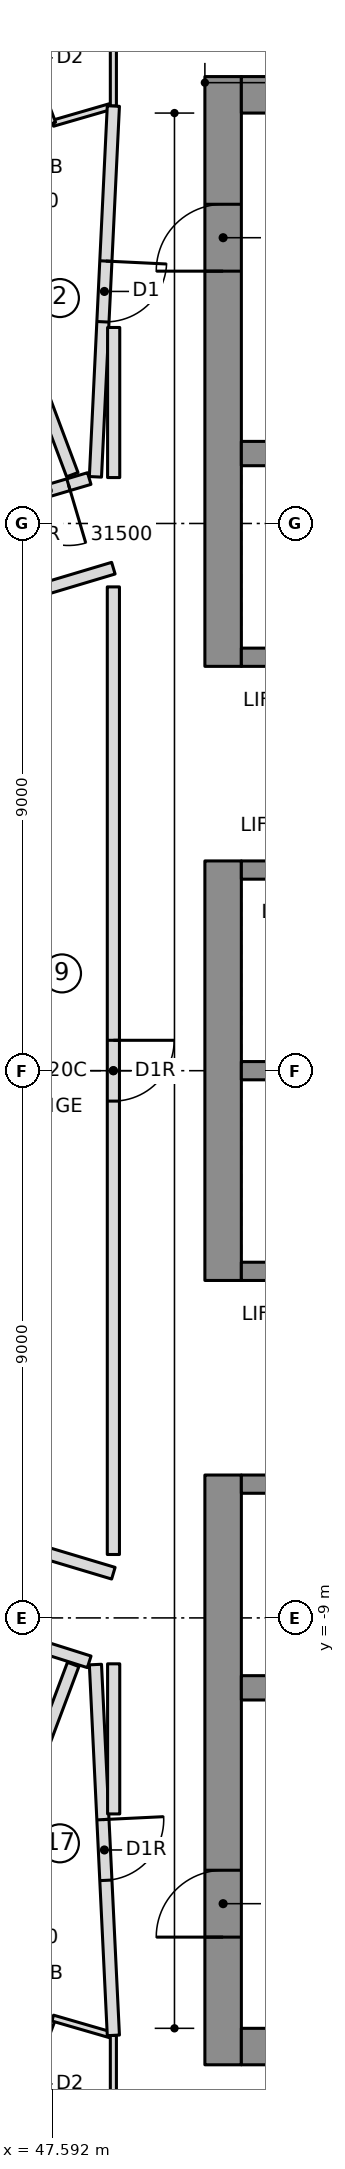
"""IFC4 building model, lengths in metres.
Left out: names, types, materials, properties, quantities, classifications, styles, units other than length and angle.
Written with IfcOpenShell. Run it as: python <this file> out.ifc"""

import sys

from ifc_helpers import new_model, si_unit, direction, frame, frame_2d, origin, place, context, subcontext, project, spatial, rectangle, extrude, element, fill, save


model = new_model("IFC4")
c1 = context("Model", 3, precision=1e-05, world=origin(), true_north=direction((0.0, 1.0)))
c2 = subcontext(c1, "Body", "Model", "MODEL_VIEW")
j1 = project(units=[si_unit("LENGTHUNIT", "METRE"), si_unit("PLANEANGLEUNIT", "RADIAN")], contexts=[c1])
p1 = place(None, origin())
s1 = spatial("IfcSite", under=j1, at=p1, CompositionType="ELEMENT")
p2 = place(p1, origin())
s2 = spatial("IfcBuilding", under=s1, at=p2, CompositionType="ELEMENT")
p3 = place(p2, frame((0.0, 0.0, 245.65)))
s3 = spatial("IfcBuildingStorey", under=s2, at=p3, CompositionType="ELEMENT", Elevation=245.65)
p4 = place(p3, frame((50.4, 6.65, 0.0), z_axis=(0.0, 0.0, 1.0), x_axis=(0.0, 1.0, 0.0)))
e1 = element("IfcWall", 1, at=p4, inside=s3, PredefinedType="SHEAR", context=c2, shape_type="SweptSolid", body=[
    extrude(rectangle(XDim=9.7, YDim=0.6, at=frame_2d((4.85, 0.0))), origin(), (0.0, 0.0, 1.0), 3.55),
])
p5 = place(p4, frame((6.5, 0.0, 0.0)))
e2 = element("IfcOpeningElement", 2, at=p5, cuts=e1, PredefinedType="OPENING", context=c2, shape_type="SweptSolid", body=[
    extrude(rectangle(XDim=1.1, YDim=2.1, at=frame_2d((0.55, 1.05))), frame((0.0, 0.31, 0.0), z_axis=(0.0, -1.0, 0.0), x_axis=(1.0, 0.0, 0.0)), (0.0, 0.0, 1.0), 0.62),
])
p6 = place(p3, frame((50.4, -3.45, 0.0), z_axis=(0.0, 0.0, 1.0), x_axis=(0.0, 1.0, 0.0)))
e3 = element("IfcWall", 3, at=p6, inside=s3, PredefinedType="SHEAR", context=c2, shape_type="SweptSolid", body=[
    extrude(rectangle(XDim=6.9, YDim=0.6, at=frame_2d((3.45, 0.0))), origin(), (0.0, 0.0, 1.0), 3.55),
])
p7 = place(p3, frame((50.4, -16.35, 0.0), z_axis=(0.0, 0.0, 1.0), x_axis=(0.0, 1.0, 0.0)))
e4 = element("IfcWall", 4, at=p7, inside=s3, PredefinedType="SHEAR", context=c2, shape_type="SweptSolid", body=[
    extrude(rectangle(XDim=9.7, YDim=0.6, at=frame_2d((4.85, 0.0))), origin(), (0.0, 0.0, 1.0), 3.55),
])
p8 = place(p7, frame((2.1, 0.0, 0.0)))
e5 = element("IfcOpeningElement", 5, at=p8, cuts=e4, PredefinedType="OPENING", context=c2, shape_type="SweptSolid", body=[
    extrude(rectangle(XDim=1.1, YDim=2.1, at=frame_2d((0.55, 1.05))), frame((0.0, 0.31, 0.0), z_axis=(0.0, -1.0, 0.0), x_axis=(1.0, 0.0, 0.0)), (0.0, 0.0, 1.0), 0.62),
])
for number, where, z_axis, x_axis in (
    (6, (50.7, 16.05, 0.0), (0.0, 0.0, 1.0), (1.0, 0.0, 0.0)),
    (7, (50.7, -16.05, 0.0), (0.0, 0.0, 1.0), (1.0, 0.0, 0.0)),
):
    element("IfcWall", number, at=place(p3, frame(where, z_axis=z_axis, x_axis=x_axis)), inside=s3, PredefinedType="SHEAR", context=c2, shape_type="SweptSolid", body=[
        extrude(rectangle(XDim=13.62, YDim=0.6, at=frame_2d((6.81, 0.0))), origin(), (0.0, 0.0, 1.0), 3.55),
    ])
p9 = place(p3, frame((50.7, 10.15, 0.0), z_axis=(0.0, 0.0, 1.0), x_axis=(1.0, 0.0, 0.0)))
e8 = element("IfcWall", 8, at=p9, inside=s3, PredefinedType="SHEAR", context=c2, shape_type="SweptSolid", body=[
    extrude(rectangle(XDim=13.02, YDim=0.4, at=frame_2d((6.51, 0.0))), origin(), (0.0, 0.0, 1.0), 3.55),
])
p10 = place(p9, frame((0.7, 0.0, 0.0)))
e9 = element("IfcOpeningElement", 9, at=p10, cuts=e8, PredefinedType="OPENING", context=c2, shape_type="SweptSolid", body=[
    extrude(rectangle(XDim=1.1, YDim=2.1, at=frame_2d((0.55, 1.05))), frame((0.0, 0.21, 0.0), z_axis=(0.0, -1.0, 0.0), x_axis=(1.0, 0.0, 0.0)), (0.0, 0.0, 1.0), 0.42),
])
p11 = place(p9, frame((3.5, 0.0, 0.0)))
e10 = element("IfcOpeningElement", 10, at=p11, cuts=e8, PredefinedType="OPENING", context=c2, shape_type="SweptSolid", body=[
    extrude(rectangle(XDim=1.1, YDim=2.1, at=frame_2d((0.55, 1.05))), frame((0.0, 0.21, 0.0), z_axis=(0.0, -1.0, 0.0), x_axis=(1.0, 0.0, 0.0)), (0.0, 0.0, 1.0), 0.42),
])
p12 = place(p3, frame((50.7, -10.15, 0.0), z_axis=(0.0, 0.0, 1.0), x_axis=(1.0, 0.0, 0.0)))
e11 = element("IfcWall", 11, at=p12, inside=s3, PredefinedType="SHEAR", context=c2, shape_type="SweptSolid", body=[
    extrude(rectangle(XDim=13.02, YDim=0.4, at=frame_2d((6.51, 0.0))), origin(), (0.0, 0.0, 1.0), 3.55),
])
p13 = place(p3, frame((50.7, 0.0, 0.0), z_axis=(0.0, 0.0, 1.0), x_axis=(1.0, 0.0, 0.0)))
e12 = element("IfcWall", 12, at=p13, inside=s3, PredefinedType="SHEAR", context=c2, shape_type="SweptSolid", body=[
    extrude(rectangle(XDim=10.9, YDim=0.3, at=frame_2d((5.45, 0.0))), origin(), (0.0, 0.0, 1.0), 3.55),
])
p14 = place(p3, frame((50.7, 3.3, 0.0), z_axis=(0.0, 0.0, 1.0), x_axis=(1.0, 0.0, 0.0)))
e13 = element("IfcWall", 13, at=p14, inside=s3, PredefinedType="SHEAR", context=c2, shape_type="SweptSolid", body=[
    extrude(rectangle(XDim=10.9, YDim=0.3, at=frame_2d((5.45, 0.0))), origin(), (0.0, 0.0, 1.0), 3.55),
])
p15 = place(p14, frame((0.7, 0.0, 0.0)))
e14 = element("IfcOpeningElement", 14, at=p15, cuts=e13, PredefinedType="OPENING", context=c2, shape_type="SweptSolid", body=[
    extrude(rectangle(XDim=1.1, YDim=2.1, at=frame_2d((0.55, 1.05))), frame((0.0, 0.16, 0.0), z_axis=(0.0, -1.0, 0.0), x_axis=(1.0, 0.0, 0.0)), (0.0, 0.0, 1.0), 0.32),
])
p16 = place(p14, frame((3.5, 0.0, 0.0)))
e15 = element("IfcOpeningElement", 15, at=p16, cuts=e13, PredefinedType="OPENING", context=c2, shape_type="SweptSolid", body=[
    extrude(rectangle(XDim=1.1, YDim=2.1, at=frame_2d((0.55, 1.05))), frame((0.0, 0.16, 0.0), z_axis=(0.0, -1.0, 0.0), x_axis=(1.0, 0.0, 0.0)), (0.0, 0.0, 1.0), 0.32),
])
p17 = place(p14, frame((6.4, 0.0, 0.0)))
e16 = element("IfcOpeningElement", 16, at=p17, cuts=e13, PredefinedType="OPENING", context=c2, shape_type="SweptSolid", body=[
    extrude(rectangle(XDim=0.9, YDim=2.1, at=frame_2d((0.45, 1.05))), frame((0.0, 0.16, 0.0), z_axis=(0.0, -1.0, 0.0), x_axis=(1.0, 0.0, 0.0)), (0.0, 0.0, 1.0), 0.32),
])
p18 = place(p14, frame((9.2, 0.0, 0.0)))
e17 = element("IfcOpeningElement", 17, at=p18, cuts=e13, PredefinedType="OPENING", context=c2, shape_type="SweptSolid", body=[
    extrude(rectangle(XDim=0.9, YDim=2.1, at=frame_2d((0.45, 1.05))), frame((0.0, 0.16, 0.0), z_axis=(0.0, -1.0, 0.0), x_axis=(1.0, 0.0, 0.0)), (0.0, 0.0, 1.0), 0.32),
])
p19 = place(p3, frame((50.7, 6.8, 0.0), z_axis=(0.0, 0.0, 1.0), x_axis=(1.0, 0.0, 0.0)))
e18 = element("IfcWall", 18, at=p19, inside=s3, PredefinedType="SHEAR", context=c2, shape_type="SweptSolid", body=[
    extrude(rectangle(XDim=10.9, YDim=0.3, at=frame_2d((5.45, 0.0))), origin(), (0.0, 0.0, 1.0), 3.55),
])
p20 = place(p19, frame((6.4, 0.0, 0.0)))
e19 = element("IfcOpeningElement", 19, at=p20, cuts=e18, PredefinedType="OPENING", context=c2, shape_type="SweptSolid", body=[
    extrude(rectangle(XDim=0.9, YDim=2.1, at=frame_2d((0.45, 1.05))), frame((0.0, 0.16, 0.0), z_axis=(0.0, -1.0, 0.0), x_axis=(1.0, 0.0, 0.0)), (0.0, 0.0, 1.0), 0.32),
])
p21 = place(p19, frame((9.2, 0.0, 0.0)))
e20 = element("IfcOpeningElement", 20, at=p21, cuts=e18, PredefinedType="OPENING", context=c2, shape_type="SweptSolid", body=[
    extrude(rectangle(XDim=0.9, YDim=2.1, at=frame_2d((0.45, 1.05))), frame((0.0, 0.16, 0.0), z_axis=(0.0, -1.0, 0.0), x_axis=(1.0, 0.0, 0.0)), (0.0, 0.0, 1.0), 0.32),
])
p22 = place(p3, frame((50.7, -3.3, 0.0), z_axis=(0.0, 0.0, 1.0), x_axis=(1.0, 0.0, 0.0)))
e21 = element("IfcWall", 21, at=p22, inside=s3, PredefinedType="SHEAR", context=c2, shape_type="SweptSolid", body=[
    extrude(rectangle(XDim=10.9, YDim=0.3, at=frame_2d((5.45, 0.0))), origin(), (0.0, 0.0, 1.0), 3.55),
])
p23 = place(p22, frame((9.1, 0.0, 0.0)))
e22 = element("IfcOpeningElement", 22, at=p23, cuts=e21, PredefinedType="OPENING", context=c2, shape_type="SweptSolid", body=[
    extrude(rectangle(XDim=1.1, YDim=2.1, at=frame_2d((0.55, 1.05))), frame((0.0, 0.16, 0.0), z_axis=(0.0, -1.0, 0.0), x_axis=(1.0, 0.0, 0.0)), (0.0, 0.0, 1.0), 0.32),
])
p24 = place(p3, frame((50.7, -6.8, 0.0), z_axis=(0.0, 0.0, 1.0), x_axis=(1.0, 0.0, 0.0)))
e23 = element("IfcWall", 23, at=p24, inside=s3, PredefinedType="SHEAR", context=c2, shape_type="SweptSolid", body=[
    extrude(rectangle(XDim=10.9, YDim=0.3, at=frame_2d((5.45, 0.0))), origin(), (0.0, 0.0, 1.0), 3.55),
])
p25 = place(p24, frame((6.3, 0.0, 0.0)))
e24 = element("IfcOpeningElement", 24, at=p25, cuts=e23, PredefinedType="OPENING", context=c2, shape_type="SweptSolid", body=[
    extrude(rectangle(XDim=1.1, YDim=2.1, at=frame_2d((0.55, 1.05))), frame((0.0, 0.16, 0.0), z_axis=(0.0, -1.0, 0.0), x_axis=(1.0, 0.0, 0.0)), (0.0, 0.0, 1.0), 0.32),
])
p26 = place(p24, frame((9.1, 0.0, 0.0)))
e25 = element("IfcOpeningElement", 25, at=p26, cuts=e23, PredefinedType="OPENING", context=c2, shape_type="SweptSolid", body=[
    extrude(rectangle(XDim=1.1, YDim=2.1, at=frame_2d((0.55, 1.05))), frame((0.0, 0.16, 0.0), z_axis=(0.0, -1.0, 0.0), x_axis=(1.0, 0.0, 0.0)), (0.0, 0.0, 1.0), 0.32),
])
p27 = place(p24, frame((0.8, 0.0, 0.0)))
e26 = element("IfcOpeningElement", 26, at=p27, cuts=e23, PredefinedType="OPENING", context=c2, shape_type="SweptSolid", body=[
    extrude(rectangle(XDim=0.9, YDim=2.1, at=frame_2d((0.45, 1.05))), frame((0.0, 0.16, 0.0), z_axis=(0.0, -1.0, 0.0), x_axis=(1.0, 0.0, 0.0)), (0.0, 0.0, 1.0), 0.32),
])
p28 = place(p24, frame((3.6, 0.0, 0.0)))
e27 = element("IfcOpeningElement", 27, at=p28, cuts=e23, PredefinedType="OPENING", context=c2, shape_type="SweptSolid", body=[
    extrude(rectangle(XDim=0.9, YDim=2.1, at=frame_2d((0.45, 1.05))), frame((0.0, 0.16, 0.0), z_axis=(0.0, -1.0, 0.0), x_axis=(1.0, 0.0, 0.0)), (0.0, 0.0, 1.0), 0.32),
])
p29 = place(p3, frame((48.198, 9.739, 0.0), z_axis=(0.0, 0.0, 1.0), x_axis=(-0.958866391875, -0.283857785753, 0.0)))
e28 = element("IfcWall", 28, at=p29, inside=s3, PredefinedType="PARTITIONING", context=c2, shape_type="SweptSolid", body=[
    extrude(rectangle(XDim=1.406, YDim=0.2, at=frame_2d((0.703, 0.0))), origin(), (0.0, 0.0, 1.0), 3.25),
])
p30 = place(p29, frame((0.356, 0.0, 0.0)))
e29 = element("IfcOpeningElement", 29, at=p30, cuts=e28, PredefinedType="OPENING", context=c2, shape_type="SweptSolid", body=[
    extrude(rectangle(XDim=1.0, YDim=2.1, at=frame_2d((0.5, 1.05))), frame((0.0, 0.11, 0.0), z_axis=(0.0, -1.0, 0.0), x_axis=(1.0, 0.0, 0.0)), (0.0, 0.0, 1.0), 0.22),
])
p31 = place(p3, frame((47.92, 9.803, 0.0), z_axis=(0.0, 0.0, 1.0), x_axis=(-0.351123441588, 0.936329177569, 0.0)))
e30 = element("IfcWall", 30, at=p31, inside=s3, PredefinedType="PARTITIONING", context=c2, shape_type="SweptSolid", body=[
    extrude(rectangle(XDim=9.568, YDim=0.2, at=frame_2d((4.784, 0.0))), origin(), (0.0, 0.0, 1.0), 3.25),
])
p32 = place(p3, frame((48.576, 15.865, 0.0), z_axis=(0.0, 0.0, 1.0), x_axis=(-0.960468222897, -0.278389642057, 0.0)))
e31 = element("IfcWall", 31, at=p32, inside=s3, PredefinedType="PARTITIONING", context=c2, shape_type="SweptSolid", body=[
    extrude(rectangle(XDim=1.019, YDim=0.1, at=frame_2d((0.51, 0.0))), origin(), (0.0, 0.0, 1.0), 3.25),
])
p33 = place(p3, frame((47.598, 15.582, 0.0), z_axis=(0.0, 0.0, 1.0), x_axis=(-0.351158236187, 0.936316128857, 0.0)))
e32 = element("IfcWall", 32, at=p33, inside=s3, PredefinedType="PARTITIONING", context=c2, shape_type="SweptSolid", body=[
    extrude(rectangle(XDim=2.307, YDim=0.1, at=frame_2d((1.153, 0.0))), origin(), (0.0, 0.0, 1.0), 3.25),
])
p34 = place(p33, frame((0.75, 0.0, 0.0)))
e33 = element("IfcOpeningElement", 33, at=p34, cuts=e32, PredefinedType="OPENING", context=c2, shape_type="SweptSolid", body=[
    extrude(rectangle(XDim=0.8, YDim=2.1, at=frame_2d((0.4, 1.05))), frame((0.0, 0.06, 0.0), z_axis=(0.0, -1.0, 0.0), x_axis=(1.0, 0.0, 0.0)), (0.0, 0.0, 1.0), 0.12),
])
p35 = place(p3, frame((39.882, -7.091, 0.0), z_axis=(0.0, 0.0, 1.0), x_axis=(0.953395918068, -0.301722096326, 0.0)))
e34 = element("IfcWall", 34, at=p35, inside=s3, PredefinedType="PARTITIONING", context=c2, shape_type="SweptSolid", body=[
    extrude(rectangle(XDim=8.722, YDim=0.2, at=frame_2d((4.361, 0.0))), origin(), (0.0, 0.0, 1.0), 3.25),
])
p36 = place(p35, frame((3.05, 0.0, 0.0)))
e35 = element("IfcOpeningElement", 35, at=p36, cuts=e34, PredefinedType="OPENING", context=c2, shape_type="SweptSolid", body=[
    extrude(rectangle(XDim=1.0, YDim=2.1, at=frame_2d((0.5, 1.05))), frame((0.0, 0.11, 0.0), z_axis=(0.0, -1.0, 0.0), x_axis=(1.0, 0.0, 0.0)), (0.0, 0.0, 1.0), 0.22),
])
p37 = place(p3, frame((44.56, -18.762, 0.0), z_axis=(0.0, 0.0, 1.0), x_axis=(0.35112901071, 0.936327089129, 0.0)))
e36 = element("IfcWall", 36, at=p37, inside=s3, PredefinedType="PARTITIONING", context=c2, shape_type="SweptSolid", body=[
    extrude(rectangle(XDim=9.608, YDim=0.2, at=frame_2d((4.804, 0.0))), origin(), (0.0, 0.0, 1.0), 3.25),
])
p38 = place(p3, frame((46.788, -17.741, 0.0), z_axis=(0.0, 0.0, 1.0), x_axis=(0.351158236187, 0.936316128857, 0.0)))
e37 = element("IfcWall", 37, at=p38, inside=s3, PredefinedType="PARTITIONING", context=c2, shape_type="SweptSolid", body=[
    extrude(rectangle(XDim=2.307, YDim=0.1, at=frame_2d((1.153, 0.0))), origin(), (0.0, 0.0, 1.0), 3.25),
])
p39 = place(p38, frame((0.75, 0.0, 0.0)))
e38 = element("IfcOpeningElement", 38, at=p39, cuts=e37, PredefinedType="OPENING", context=c2, shape_type="SweptSolid", body=[
    extrude(rectangle(XDim=0.8, YDim=2.1, at=frame_2d((0.4, 1.05))), frame((0.0, 0.06, 0.0), z_axis=(0.0, -1.0, 0.0), x_axis=(1.0, 0.0, 0.0)), (0.0, 0.0, 1.0), 0.12),
])
p40 = place(p3, frame((47.598, -15.582, 0.0), z_axis=(0.0, 0.0, 1.0), x_axis=(0.960468222897, -0.278389642057, 0.0)))
e39 = element("IfcWall", 39, at=p40, inside=s3, PredefinedType="PARTITIONING", context=c2, shape_type="SweptSolid", body=[
    extrude(rectangle(XDim=1.019, YDim=0.1, at=frame_2d((0.51, 0.0))), origin(), (0.0, 0.0, 1.0), 3.25),
])
for number, where, z_axis, x_axis in (
    (40, (48.595, 18.296, 0.0), (0.0, 0.0, 1.0), (0.0, -1.0, 0.0)),
    (41, (48.595, -15.866, 0.0), (0.0, 0.0, 1.0), (0.0, -1.0, 0.0)),
):
    element("IfcWall", number, at=place(p3, frame(where, z_axis=z_axis, x_axis=x_axis)), inside=s3, PredefinedType="PARTITIONING", context=c2, shape_type="SweptSolid", body=[
        extrude(rectangle(XDim=2.431, YDim=0.1, at=frame_2d((1.215, 0.0))), origin(), (0.0, 0.0, 1.0), 3.25),
    ])
p41 = place(p3, frame((48.595, 7.957, 0.0), z_axis=(0.0, 0.0, 1.0), x_axis=(0.0, -1.0, 0.0)))
e42 = element("IfcWall", 42, at=p41, inside=s3, PredefinedType="PARTITIONING", context=c2, shape_type="SweptSolid", body=[
    extrude(rectangle(XDim=15.914, YDim=0.2, at=frame_2d((7.957, 0.0))), origin(), (0.0, 0.0, 1.0), 3.25),
])
p42 = place(p41, frame((7.457, 0.0, 0.0)))
e43 = element("IfcOpeningElement", 43, at=p42, cuts=e42, PredefinedType="OPENING", context=c2, shape_type="SweptSolid", body=[
    extrude(rectangle(XDim=1.0, YDim=2.1, at=frame_2d((0.5, 1.05))), frame((0.0, 0.11, 0.0), z_axis=(0.0, -1.0, 0.0), x_axis=(1.0, 0.0, 0.0)), (0.0, 0.0, 1.0), 0.22),
])
p43 = place(p3, frame((48.595, 15.866, 0.0), z_axis=(0.0, 0.0, 1.0), x_axis=(-0.048302241024, -0.998832765538, 0.0)))
e44 = element("IfcWall", 44, at=p43, inside=s3, PredefinedType="PARTITIONING", context=c2, shape_type="SweptSolid", body=[
    extrude(rectangle(XDim=6.106, YDim=0.2, at=frame_2d((3.053, 0.0))), origin(), (0.0, 0.0, 1.0), 3.25),
])
p44 = place(p43, frame((2.553, 0.0, 0.0)))
e45 = element("IfcOpeningElement", 45, at=p44, cuts=e44, PredefinedType="OPENING", context=c2, shape_type="SweptSolid", body=[
    extrude(rectangle(XDim=1.0, YDim=2.1, at=frame_2d((0.5, 1.05))), frame((0.0, 0.11, 0.0), z_axis=(0.0, -1.0, 0.0), x_axis=(1.0, 0.0, 0.0)), (0.0, 0.0, 1.0), 0.22),
])
p45 = place(p3, frame((48.3, -9.767, 0.0), z_axis=(0.0, 0.0, 1.0), x_axis=(0.048302241024, -0.998832765538, 0.0)))
e46 = element("IfcWall", 46, at=p45, inside=s3, PredefinedType="PARTITIONING", context=c2, shape_type="SweptSolid", body=[
    extrude(rectangle(XDim=6.106, YDim=0.2, at=frame_2d((3.053, 0.0))), origin(), (0.0, 0.0, 1.0), 3.25),
])
p46 = place(p45, frame((2.553, 0.0, 0.0)))
e47 = element("IfcOpeningElement", 47, at=p46, cuts=e46, PredefinedType="OPENING", context=c2, shape_type="SweptSolid", body=[
    extrude(rectangle(XDim=1.0, YDim=2.1, at=frame_2d((0.5, 1.05))), frame((0.0, 0.11, 0.0), z_axis=(0.0, -1.0, 0.0), x_axis=(1.0, 0.0, 0.0)), (0.0, 0.0, 1.0), 0.22),
])
for number, where, z_axis, x_axis in (
    (48, (46.855, 7.744, 0.0), (0.0, 0.0, 1.0), (0.958, 0.287, 0.0)),
    (49, (48.595, -8.265, 0.0), (0.0, 0.0, 1.0), (-0.958, 0.287, 0.0)),
):
    element("IfcWall", number, at=place(p3, frame(where, z_axis=z_axis, x_axis=x_axis)), inside=s3, PredefinedType="PARTITIONING", context=c2, shape_type="SweptSolid", body=[
        extrude(rectangle(XDim=1.816, YDim=0.2, at=frame_2d((0.908, 0.0))), origin(), (0.0, 0.0, 1.0), 3.25),
    ])
p47 = place(p3, frame((48.6, 9.755, 0.0), z_axis=(0.0, 0.0, 1.0), x_axis=(0.0, 1.0, 0.0)))
e50 = element("IfcWall", 50, at=p47, inside=s3, PredefinedType="PARTITIONING", context=c2, shape_type="SweptSolid", body=[
    extrude(rectangle(XDim=2.469, YDim=0.2, at=frame_2d((1.234, 0.0))), origin(), (0.0, 0.0, 1.0), 3.25),
])
p48 = place(p3, frame((48.6, -12.224, 0.0), z_axis=(0.0, 0.0, 1.0), x_axis=(0.0, 1.0, 0.0)))
e51 = element("IfcWall", 51, at=p48, inside=s3, PredefinedType="PARTITIONING", context=c2, shape_type="SweptSolid", body=[
    extrude(rectangle(XDim=2.469, YDim=0.2, at=frame_2d((1.234, 0.0))), origin(), (0.0, 0.0, 1.0), 3.25),
])
p49 = place(p30, origin())
e52 = element("IfcDoor", 52, at=p49, inside=s3, OperationType="SINGLE_SWING_RIGHT", PredefinedType="DOOR", context=c2, shape_type="SweptSolid", body=[
    extrude(rectangle(XDim=1.0, YDim=2.1, at=frame_2d((0.5, 1.05))), frame((0.0, 0.025, 0.0), z_axis=(0.0, -1.0, 0.0), x_axis=(1.0, 0.0, 0.0)), (0.0, 0.0, 1.0), 0.05),
])
fill(e29, e52)
p50 = place(p42, origin())
e53 = element("IfcDoor", 53, at=p50, inside=s3, OperationType="SINGLE_SWING_RIGHT", PredefinedType="DOOR", context=c2, shape_type="SweptSolid", body=[
    extrude(rectangle(XDim=1.0, YDim=2.1, at=frame_2d((0.5, 1.05))), frame((0.0, 0.025, 0.0), z_axis=(0.0, -1.0, 0.0), x_axis=(1.0, 0.0, 0.0)), (0.0, 0.0, 1.0), 0.05),
])
fill(e43, e53)
p51 = place(p44, origin())
e54 = element("IfcDoor", 54, at=p51, inside=s3, OperationType="SINGLE_SWING_LEFT", PredefinedType="DOOR", context=c2, shape_type="SweptSolid", body=[
    extrude(rectangle(XDim=1.0, YDim=2.1, at=frame_2d((0.5, 1.05))), frame((0.0, 0.025, 0.0), z_axis=(0.0, -1.0, 0.0), x_axis=(1.0, 0.0, 0.0)), (0.0, 0.0, 1.0), 0.05),
])
fill(e45, e54)
p52 = place(p46, origin())
e55 = element("IfcDoor", 55, at=p52, inside=s3, OperationType="SINGLE_SWING_RIGHT", PredefinedType="DOOR", context=c2, shape_type="SweptSolid", body=[
    extrude(rectangle(XDim=1.0, YDim=2.1, at=frame_2d((0.5, 1.05))), frame((0.0, 0.025, 0.0), z_axis=(0.0, -1.0, 0.0), x_axis=(1.0, 0.0, 0.0)), (0.0, 0.0, 1.0), 0.05),
])
fill(e47, e55)
p53 = place(p5, origin())
e56 = element("IfcDoor", 56, at=p53, inside=s3, OperationType="SINGLE_SWING_RIGHT", PredefinedType="DOOR", context=c2, shape_type="SweptSolid", body=[
    extrude(rectangle(XDim=1.1, YDim=2.1, at=frame_2d((0.55, 1.05))), frame((0.0, 0.025, 0.0), z_axis=(0.0, -1.0, 0.0), x_axis=(1.0, 0.0, 0.0)), (0.0, 0.0, 1.0), 0.05),
])
fill(e2, e56)
p54 = place(p8, origin())
e57 = element("IfcDoor", 57, at=p54, inside=s3, OperationType="SINGLE_SWING_RIGHT", PredefinedType="DOOR", context=c2, shape_type="SweptSolid", body=[
    extrude(rectangle(XDim=1.1, YDim=2.1, at=frame_2d((0.55, 1.05))), frame((0.0, 0.025, 0.0), z_axis=(0.0, -1.0, 0.0), x_axis=(1.0, 0.0, 0.0)), (0.0, 0.0, 1.0), 0.05),
])
fill(e5, e57)
save(model, sys.argv[1])
